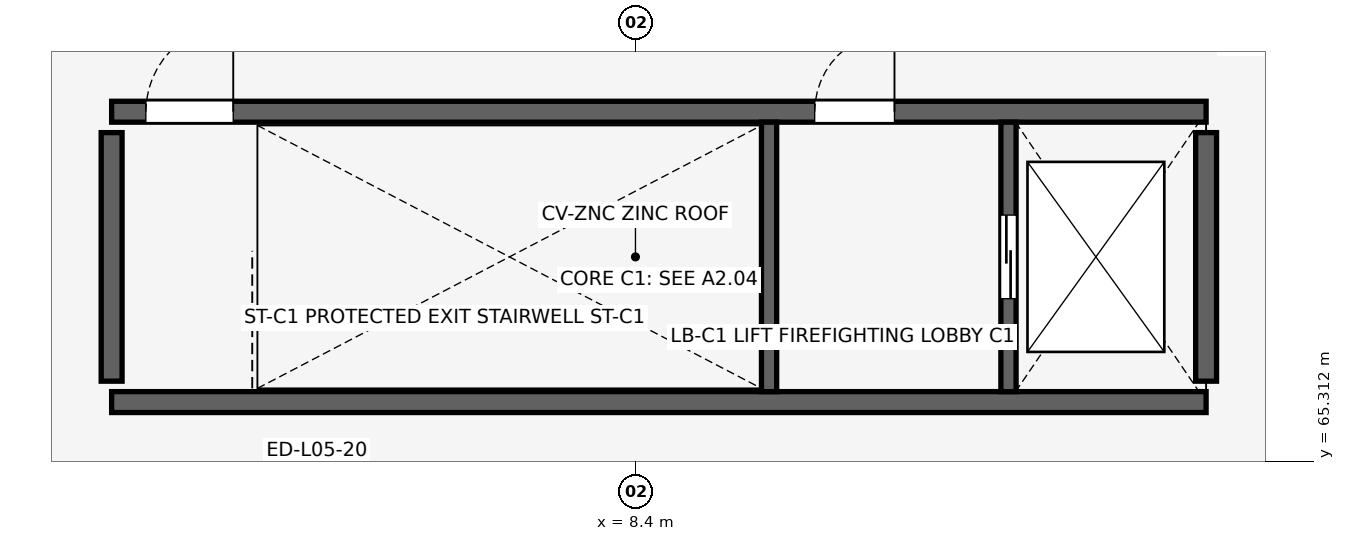
"""IFC4 building model, lengths in metres.
Left out: names, types, materials, properties, quantities, classifications, styles, units other than length and angle.
Written with IfcOpenShell. Run it as: python <this file> out.ifc"""

import sys

from ifc_helpers import new_model, si_unit, direction, frame, frame_2d, origin, place, context, subcontext, project, spatial, rectangle, extrude, element, fill, save


model = new_model("IFC4")
c1 = context("Model", 3, precision=1e-05, world=origin(), true_north=direction((0.0, 1.0)))
c2 = subcontext(c1, "Body", "Model", "MODEL_VIEW")
j1 = project(units=[si_unit("LENGTHUNIT", "METRE"), si_unit("PLANEANGLEUNIT", "RADIAN")], contexts=[c1])
p1 = place(None, origin())
s1 = spatial("IfcSite", under=j1, at=p1, CompositionType="ELEMENT")
p2 = place(p1, origin())
s2 = spatial("IfcBuilding", under=s1, at=p2, CompositionType="ELEMENT")
p3 = place(p2, frame((0.0, 0.0, 21.04)))
s3 = spatial("IfcBuildingStorey", under=s2, at=p3, CompositionType="ELEMENT", Elevation=21.04)
p4 = place(p3, frame((1.5, 66.09, 0.0), z_axis=(0.0, 0.0, 1.0), x_axis=(1.0, 0.0, 0.0)))
e1 = element("IfcWall", 1, at=p4, inside=s3, PredefinedType="SHEAR", context=c2, shape_type="SweptSolid", body=[
    extrude(rectangle(XDim=14.4, YDim=0.275, at=frame_2d((7.2, 0.0))), origin(), (0.0, 0.0, 1.0), 3.92),
])
p5 = place(p3, frame((1.5, 69.91, 0.0), z_axis=(0.0, 0.0, 1.0), x_axis=(1.0, 0.0, 0.0)))
e2 = element("IfcWall", 2, at=p5, inside=s3, PredefinedType="SHEAR", context=c2, shape_type="SweptSolid", body=[
    extrude(rectangle(XDim=14.4, YDim=0.275, at=frame_2d((7.2, 0.0))), origin(), (0.0, 0.0, 1.0), 3.92),
])
p6 = place(p5, frame((0.45, 0.0, 0.0), z_axis=(0.0, 0.0, 1.0), x_axis=(1.0, 0.0, 0.0)))
e3 = element("IfcOpeningElement", 3, at=p6, cuts=e2, PredefinedType="OPENING", context=c2, shape_type="SweptSolid", body=[
    extrude(rectangle(XDim=1.15, YDim=2.15, at=frame_2d((0.575, 1.075))), frame((0.0, 0.147, 0.0), z_axis=(0.0, -1.0, 0.0), x_axis=(1.0, 0.0, 0.0)), (0.0, 0.0, 1.0), 0.295),
])
p7 = place(p5, frame((9.25, 0.0, 0.0), z_axis=(0.0, 0.0, 1.0), x_axis=(1.0, 0.0, 0.0)))
e4 = element("IfcOpeningElement", 4, at=p7, cuts=e2, PredefinedType="OPENING", context=c2, shape_type="SweptSolid", body=[
    extrude(rectangle(XDim=1.05, YDim=2.15, at=frame_2d((0.525, 1.075))), frame((0.0, 0.147, 0.0), z_axis=(0.0, -1.0, 0.0), x_axis=(1.0, 0.0, 0.0)), (0.0, 0.0, 1.0), 0.295),
])
for number, where, z_axis, x_axis in (
    (5, (1.5, 66.365, 0.0), (0.0, 0.0, 1.0), (0.0, 1.0, 0.0)),
    (6, (15.9, 66.365, 0.0), (0.0, 0.0, 1.0), (0.0, 1.0, 0.0)),
):
    element("IfcWall", number, at=place(p3, frame(where, z_axis=z_axis, x_axis=x_axis)), inside=s3, PredefinedType="SHEAR", context=c2, shape_type="SweptSolid", body=[
        extrude(rectangle(XDim=3.27, YDim=0.275, at=frame_2d((1.635, 0.0))), origin(), (0.0, 0.0, 1.0), 3.92),
    ])
p8 = place(p3, frame((10.15, 66.228, 0.0), z_axis=(0.0, 0.0, 1.0), x_axis=(0.0, 1.0, 0.0)))
e7 = element("IfcWall", 7, at=p8, inside=s3, PredefinedType="SHEAR", context=c2, shape_type="SweptSolid", body=[
    extrude(rectangle(XDim=3.545, YDim=0.2, at=frame_2d((1.772, 0.0))), origin(), (0.0, 0.0, 1.0), 3.92),
])
p9 = place(p3, frame((13.3, 66.228, 0.0), z_axis=(0.0, 0.0, 1.0), x_axis=(0.0, 1.0, 0.0)))
e8 = element("IfcWall", 8, at=p9, inside=s3, PredefinedType="SHEAR", context=c2, shape_type="SweptSolid", body=[
    extrude(rectangle(XDim=3.545, YDim=0.2, at=frame_2d((1.772, 0.0))), origin(), (0.0, 0.0, 1.0), 3.92),
])
p10 = place(p9, frame((1.222, 0.0, 0.0), z_axis=(0.0, 0.0, 1.0), x_axis=(1.0, 0.0, 0.0)))
e9 = element("IfcOpeningElement", 9, at=p10, cuts=e8, PredefinedType="OPENING", context=c2, shape_type="SweptSolid", body=[
    extrude(rectangle(XDim=1.1, YDim=2.15, at=frame_2d((0.55, 1.075))), frame((0.0, 0.11, 0.0), z_axis=(0.0, -1.0, 0.0), x_axis=(1.0, 0.0, 0.0)), (0.0, 0.0, 1.0), 0.22),
])
p11 = place(p6, origin())
e10 = element("IfcDoor", 10, at=p11, inside=s3, OperationType="SINGLE_SWING_RIGHT", PredefinedType="DOOR", context=c2, shape_type="SweptSolid", body=[
    extrude(rectangle(XDim=1.15, YDim=2.15, at=frame_2d((0.575, 1.075))), frame((0.0, 0.025, 0.0), z_axis=(0.0, -1.0, 0.0), x_axis=(1.0, 0.0, 0.0)), (0.0, 0.0, 1.0), 0.05),
])
fill(e3, e10)
p12 = place(p7, origin())
e11 = element("IfcDoor", 11, at=p12, inside=s3, OperationType="SINGLE_SWING_RIGHT", PredefinedType="DOOR", context=c2, shape_type="SweptSolid", body=[
    extrude(rectangle(XDim=1.05, YDim=2.15, at=frame_2d((0.525, 1.075))), frame((0.0, 0.025, 0.0), z_axis=(0.0, -1.0, 0.0), x_axis=(1.0, 0.0, 0.0)), (0.0, 0.0, 1.0), 0.05),
])
fill(e4, e11)
p13 = place(p10, origin())
e12 = element("IfcDoor", 12, at=p13, inside=s3, OperationType="DOUBLE_DOOR_SLIDING", PredefinedType="DOOR", context=c2, shape_type="SweptSolid", body=[
    extrude(rectangle(XDim=1.1, YDim=2.15, at=frame_2d((0.55, 1.075))), frame((0.0, 0.025, 0.0), z_axis=(0.0, -1.0, 0.0), x_axis=(1.0, 0.0, 0.0)), (0.0, 0.0, 1.0), 0.05),
])
fill(e9, e12)
save(model, sys.argv[1])
